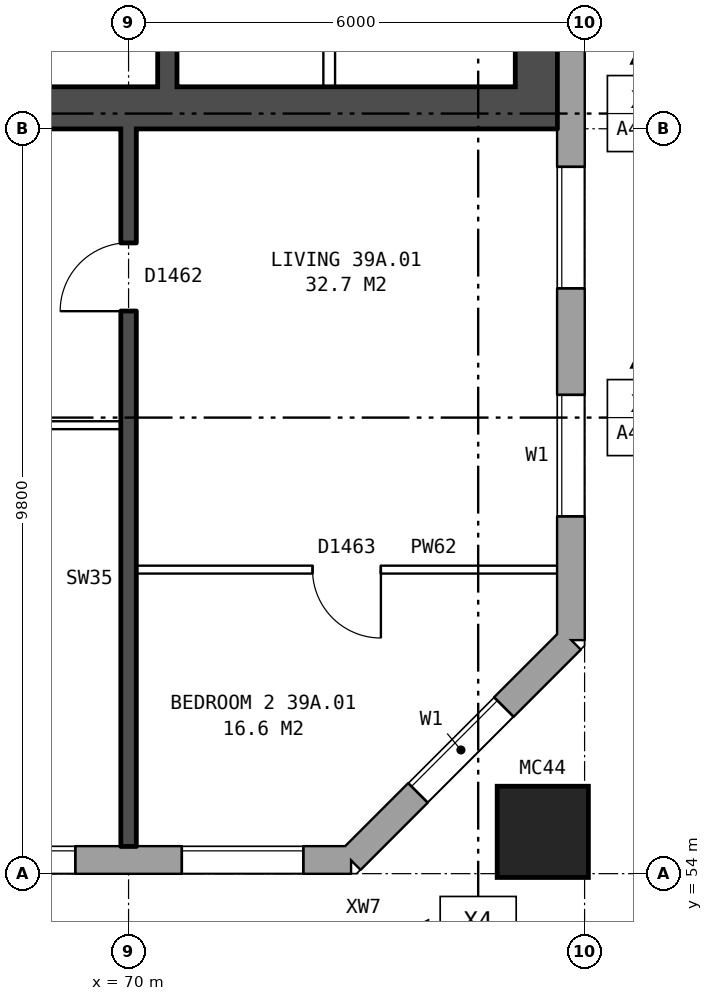
"""IFC4 building model, lengths in metres.
Left out: names, types, materials, properties, quantities, classifications, styles, units other than length and angle.
Written with IfcOpenShell. Run it as: python <this file> out.ifc"""

import sys

from ifc_helpers import new_model, si_unit, direction, frame, frame_2d, origin, origin_2d, place, context, subcontext, project, spatial, rectangle, hollow_rectangle, extrude, element, fill, save


model = new_model("IFC4")
c1 = context("Model", 3, precision=1e-05, world=origin(), true_north=direction((0.0, 1.0)))
c2 = subcontext(c1, "Body", "Model", "MODEL_VIEW")
j1 = project(units=[si_unit("LENGTHUNIT", "METRE"), si_unit("PLANEANGLEUNIT", "RADIAN")], contexts=[c1])
p1 = place(None, origin())
s1 = spatial("IfcSite", under=j1, at=p1, CompositionType="ELEMENT")
p2 = place(p1, origin())
s2 = spatial("IfcBuilding", under=s1, at=p2, CompositionType="ELEMENT")
p3 = place(p2, frame((0.0, 0.0, 139.2)))
s3 = spatial("IfcBuildingStorey", under=s2, at=p3, CompositionType="ELEMENT", Elevation=139.2)
p4 = place(p3, frame((75.45, 54.55, 0.0), z_axis=(0.0, 0.0, 1.0), x_axis=(1.0, 0.0, 0.0)))
e1 = element("IfcColumn", 1, at=p4, inside=s3, PredefinedType="COLUMN", context=c2, shape_type="SweptSolid", body=[
    extrude(hollow_rectangle(XDim=1.2, YDim=1.2, WallThickness=0.065, at=origin_2d()), origin(), (0.0, 0.0, 1.0), 3.1),
])
p5 = place(p3, frame((29.825, 54.18, 0.0), z_axis=(0.0, 0.0, 1.0), x_axis=(1.0, 0.0, 0.0)))
e2 = element("IfcWall", 2, at=p5, inside=s3, PredefinedType="STANDARD", context=c2, shape_type="SweptSolid", body=[
    extrude(rectangle(XDim=43.101, YDim=0.36, at=frame_2d((21.55, 0.0))), origin(), (0.0, 0.0, 1.0), 2.85),
])
p6 = place(p5, frame((1.875, 0.0, 0.8)))
e3 = element("IfcOpeningElement", 3, at=p6, cuts=e2, PredefinedType="OPENING", context=c2, shape_type="SweptSolid", body=[
    extrude(rectangle(XDim=1.6, YDim=1.8, at=frame_2d((0.8, 0.9))), frame((0.0, 0.19, 0.0), z_axis=(0.0, -1.0, 0.0), x_axis=(1.0, 0.0, 0.0)), (0.0, 0.0, 1.0), 0.38),
])
p7 = place(p5, frame((4.875, 0.0, 0.8)))
e4 = element("IfcOpeningElement", 4, at=p7, cuts=e2, PredefinedType="OPENING", context=c2, shape_type="SweptSolid", body=[
    extrude(rectangle(XDim=1.6, YDim=1.8, at=frame_2d((0.8, 0.9))), frame((0.0, 0.19, 0.0), z_axis=(0.0, -1.0, 0.0), x_axis=(1.0, 0.0, 0.0)), (0.0, 0.0, 1.0), 0.38),
])
p8 = place(p5, frame((7.875, 0.0, 0.8)))
e5 = element("IfcOpeningElement", 5, at=p8, cuts=e2, PredefinedType="OPENING", context=c2, shape_type="SweptSolid", body=[
    extrude(rectangle(XDim=1.6, YDim=1.8, at=frame_2d((0.8, 0.9))), frame((0.0, 0.19, 0.0), z_axis=(0.0, -1.0, 0.0), x_axis=(1.0, 0.0, 0.0)), (0.0, 0.0, 1.0), 0.38),
])
p9 = place(p5, frame((10.875, 0.0, 0.8)))
e6 = element("IfcOpeningElement", 6, at=p9, cuts=e2, PredefinedType="OPENING", context=c2, shape_type="SweptSolid", body=[
    extrude(rectangle(XDim=1.6, YDim=1.8, at=frame_2d((0.8, 0.9))), frame((0.0, 0.19, 0.0), z_axis=(0.0, -1.0, 0.0), x_axis=(1.0, 0.0, 0.0)), (0.0, 0.0, 1.0), 0.38),
])
p10 = place(p5, frame((13.875, 0.0, 0.8)))
e7 = element("IfcOpeningElement", 7, at=p10, cuts=e2, PredefinedType="OPENING", context=c2, shape_type="SweptSolid", body=[
    extrude(rectangle(XDim=1.6, YDim=1.8, at=frame_2d((0.8, 0.9))), frame((0.0, 0.19, 0.0), z_axis=(0.0, -1.0, 0.0), x_axis=(1.0, 0.0, 0.0)), (0.0, 0.0, 1.0), 0.38),
])
p11 = place(p5, frame((16.875, 0.0, 0.8)))
e8 = element("IfcOpeningElement", 8, at=p11, cuts=e2, PredefinedType="OPENING", context=c2, shape_type="SweptSolid", body=[
    extrude(rectangle(XDim=1.6, YDim=1.8, at=frame_2d((0.8, 0.9))), frame((0.0, 0.19, 0.0), z_axis=(0.0, -1.0, 0.0), x_axis=(1.0, 0.0, 0.0)), (0.0, 0.0, 1.0), 0.38),
])
p12 = place(p5, frame((20.975, 0.0, 0.15)))
e9 = element("IfcOpeningElement", 9, at=p12, cuts=e2, PredefinedType="OPENING", context=c2, shape_type="SweptSolid", body=[
    extrude(rectangle(XDim=1.0, YDim=1.5, at=frame_2d((0.5, 0.75))), frame((0.0, 0.19, 0.0), z_axis=(0.0, -1.0, 0.0), x_axis=(1.0, 0.0, 0.0)), (0.0, 0.0, 1.0), 0.38),
])
p13 = place(p5, frame((23.225, 0.0, 1.7)))
e10 = element("IfcOpeningElement", 10, at=p13, cuts=e2, PredefinedType="OPENING", context=c2, shape_type="SweptSolid", body=[
    extrude(rectangle(XDim=0.6, YDim=0.9, at=frame_2d((0.3, 0.45))), frame((0.0, 0.19, 0.0), z_axis=(0.0, -1.0, 0.0), x_axis=(1.0, 0.0, 0.0)), (0.0, 0.0, 1.0), 0.38),
])
p14 = place(p5, frame((25.875, 0.0, 0.8)))
e11 = element("IfcOpeningElement", 11, at=p14, cuts=e2, PredefinedType="OPENING", context=c2, shape_type="SweptSolid", body=[
    extrude(rectangle(XDim=1.6, YDim=1.8, at=frame_2d((0.8, 0.9))), frame((0.0, 0.19, 0.0), z_axis=(0.0, -1.0, 0.0), x_axis=(1.0, 0.0, 0.0)), (0.0, 0.0, 1.0), 0.38),
])
p15 = place(p5, frame((28.875, 0.0, 0.8)))
e12 = element("IfcOpeningElement", 12, at=p15, cuts=e2, PredefinedType="OPENING", context=c2, shape_type="SweptSolid", body=[
    extrude(rectangle(XDim=1.6, YDim=1.8, at=frame_2d((0.8, 0.9))), frame((0.0, 0.19, 0.0), z_axis=(0.0, -1.0, 0.0), x_axis=(1.0, 0.0, 0.0)), (0.0, 0.0, 1.0), 0.38),
])
p16 = place(p5, frame((31.875, 0.0, 0.8)))
e13 = element("IfcOpeningElement", 13, at=p16, cuts=e2, PredefinedType="OPENING", context=c2, shape_type="SweptSolid", body=[
    extrude(rectangle(XDim=1.6, YDim=1.8, at=frame_2d((0.8, 0.9))), frame((0.0, 0.19, 0.0), z_axis=(0.0, -1.0, 0.0), x_axis=(1.0, 0.0, 0.0)), (0.0, 0.0, 1.0), 0.38),
])
p17 = place(p5, frame((34.875, 0.0, 0.8)))
e14 = element("IfcOpeningElement", 14, at=p17, cuts=e2, PredefinedType="OPENING", context=c2, shape_type="SweptSolid", body=[
    extrude(rectangle(XDim=1.6, YDim=1.8, at=frame_2d((0.8, 0.9))), frame((0.0, 0.19, 0.0), z_axis=(0.0, -1.0, 0.0), x_axis=(1.0, 0.0, 0.0)), (0.0, 0.0, 1.0), 0.38),
])
p18 = place(p5, frame((37.875, 0.0, 0.8)))
e15 = element("IfcOpeningElement", 15, at=p18, cuts=e2, PredefinedType="OPENING", context=c2, shape_type="SweptSolid", body=[
    extrude(rectangle(XDim=1.6, YDim=1.8, at=frame_2d((0.8, 0.9))), frame((0.0, 0.19, 0.0), z_axis=(0.0, -1.0, 0.0), x_axis=(1.0, 0.0, 0.0)), (0.0, 0.0, 1.0), 0.38),
])
p19 = place(p5, frame((40.875, 0.0, 0.8)))
e16 = element("IfcOpeningElement", 16, at=p19, cuts=e2, PredefinedType="OPENING", context=c2, shape_type="SweptSolid", body=[
    extrude(rectangle(XDim=1.6, YDim=1.8, at=frame_2d((0.8, 0.9))), frame((0.0, 0.19, 0.0), z_axis=(0.0, -1.0, 0.0), x_axis=(1.0, 0.0, 0.0)), (0.0, 0.0, 1.0), 0.38),
])
p20 = place(p5, frame((24.225, 0.0, 0.8)))
e17 = element("IfcOpeningElement", 17, at=p20, cuts=e2, PredefinedType="OPENING", context=c2, shape_type="SweptSolid", body=[
    extrude(rectangle(XDim=0.8, YDim=1.8, at=frame_2d((0.4, 0.9))), frame((0.0, 0.19, 0.0), z_axis=(0.0, -1.0, 0.0), x_axis=(1.0, 0.0, 0.0)), (0.0, 0.0, 1.0), 0.38),
])
p21 = place(p3, frame((72.925, 54.18, 0.0), z_axis=(0.0, 0.0, 1.0), x_axis=(0.707106781187, 0.707106781187, 0.0)))
e18 = element("IfcWall", 18, at=p21, inside=s3, PredefinedType="STANDARD", context=c2, shape_type="SweptSolid", body=[
    extrude(rectangle(XDim=4.094, YDim=0.36, at=frame_2d((2.047, 0.0))), origin(), (0.0, 0.0, 1.0), 2.85),
])
p22 = place(p21, frame((1.247, 0.0, 0.8)))
e19 = element("IfcOpeningElement", 19, at=p22, cuts=e18, PredefinedType="OPENING", context=c2, shape_type="SweptSolid", body=[
    extrude(rectangle(XDim=1.6, YDim=1.8, at=frame_2d((0.8, 0.9))), frame((0.0, 0.19, 0.0), z_axis=(0.0, -1.0, 0.0), x_axis=(1.0, 0.0, 0.0)), (0.0, 0.0, 1.0), 0.38),
])
p23 = place(p3, frame((75.82, 57.075, 0.0), z_axis=(0.0, 0.0, 1.0), x_axis=(0.0, 1.0, 0.0)))
e20 = element("IfcWall", 20, at=p23, inside=s3, PredefinedType="STANDARD", context=c2, shape_type="SweptSolid", body=[
    extrude(rectangle(XDim=25.851, YDim=0.36, at=frame_2d((12.925, 0.0))), origin(), (0.0, 0.0, 1.0), 2.85),
])
p24 = place(p23, frame((1.625, 0.0, 0.8)))
e21 = element("IfcOpeningElement", 21, at=p24, cuts=e20, PredefinedType="OPENING", context=c2, shape_type="SweptSolid", body=[
    extrude(rectangle(XDim=1.6, YDim=1.8, at=frame_2d((0.8, 0.9))), frame((0.0, 0.19, 0.0), z_axis=(0.0, -1.0, 0.0), x_axis=(1.0, 0.0, 0.0)), (0.0, 0.0, 1.0), 0.38),
])
p25 = place(p23, frame((4.625, 0.0, 0.8)))
e22 = element("IfcOpeningElement", 22, at=p25, cuts=e20, PredefinedType="OPENING", context=c2, shape_type="SweptSolid", body=[
    extrude(rectangle(XDim=1.6, YDim=1.8, at=frame_2d((0.8, 0.9))), frame((0.0, 0.19, 0.0), z_axis=(0.0, -1.0, 0.0), x_axis=(1.0, 0.0, 0.0)), (0.0, 0.0, 1.0), 0.38),
])
p26 = place(p23, frame((19.625, 0.0, 0.8)))
e23 = element("IfcOpeningElement", 23, at=p26, cuts=e20, PredefinedType="OPENING", context=c2, shape_type="SweptSolid", body=[
    extrude(rectangle(XDim=1.6, YDim=1.8, at=frame_2d((0.8, 0.9))), frame((0.0, 0.19, 0.0), z_axis=(0.0, -1.0, 0.0), x_axis=(1.0, 0.0, 0.0)), (0.0, 0.0, 1.0), 0.38),
])
p27 = place(p23, frame((22.625, 0.0, 0.8)))
e24 = element("IfcOpeningElement", 24, at=p27, cuts=e20, PredefinedType="OPENING", context=c2, shape_type="SweptSolid", body=[
    extrude(rectangle(XDim=1.6, YDim=1.8, at=frame_2d((0.8, 0.9))), frame((0.0, 0.19, 0.0), z_axis=(0.0, -1.0, 0.0), x_axis=(1.0, 0.0, 0.0)), (0.0, 0.0, 1.0), 0.38),
])
p28 = place(p3, frame((75.365, 63.8, 0.0), z_axis=(0.0, 0.0, 1.0), x_axis=(0.0, 1.0, 0.0)))
e25 = element("IfcWall", 25, at=p28, inside=s3, PredefinedType="SHEAR", context=c2, shape_type="SweptSolid", body=[
    extrude(rectangle(XDim=12.4, YDim=0.55, at=frame_2d((6.2, 0.0))), origin(), (0.0, 0.0, 1.0), 2.85),
])
p29 = place(p3, frame((67.19, 64.075, 0.0), z_axis=(0.0, 0.0, 1.0), x_axis=(1.0, 0.0, 0.0)))
e26 = element("IfcWall", 26, at=p29, inside=s3, PredefinedType="SHEAR", context=c2, shape_type="SweptSolid", body=[
    extrude(rectangle(XDim=7.9, YDim=0.55, at=frame_2d((3.95, 0.0))), origin(), (0.0, 0.0, 1.0), 2.85),
])
p30 = place(p3, frame((70.51, 64.35, 0.0), z_axis=(0.0, 0.0, 1.0), x_axis=(0.0, 1.0, 0.0)))
e27 = element("IfcWall", 27, at=p30, inside=s3, PredefinedType="SHEAR", context=c2, shape_type="SweptSolid", body=[
    extrude(rectangle(XDim=2.375, YDim=0.25, at=frame_2d((1.188, 0.0))), origin(), (0.0, 0.0, 1.0), 2.85),
])
p31 = place(p3, frame((72.64, 64.35, 0.0), z_axis=(0.0, 0.0, 1.0), x_axis=(0.0, 1.0, 0.0)))
e28 = element("IfcWall", 28, at=p31, inside=s3, PredefinedType="PARTITIONING", context=c2, shape_type="SweptSolid", body=[
    extrude(rectangle(XDim=1.875, YDim=0.15, at=frame_2d((0.938, 0.0))), origin(), (0.0, 0.0, 1.0), 2.85),
])
p32 = place(p31, frame((0.512, 0.0, 0.0)))
e29 = element("IfcOpeningElement", 29, at=p32, cuts=e28, PredefinedType="OPENING", context=c2, shape_type="SweptSolid", body=[
    extrude(rectangle(XDim=0.85, YDim=2.1, at=frame_2d((0.425, 1.05))), frame((0.0, 0.085, 0.0), z_axis=(0.0, -1.0, 0.0), x_axis=(1.0, 0.0, 0.0)), (0.0, 0.0, 1.0), 0.17),
])
p33 = place(p3, frame((70.1, 58.0, 0.0), z_axis=(0.0, 0.0, 1.0), x_axis=(1.0, 0.0, 0.0)))
e30 = element("IfcWall", 30, at=p33, inside=s3, PredefinedType="PARTITIONING", context=c2, shape_type="SweptSolid", body=[
    extrude(rectangle(XDim=5.54, YDim=0.1, at=frame_2d((2.77, 0.0))), origin(), (0.0, 0.0, 1.0), 2.85),
])
p34 = place(p33, frame((2.32, 0.0, 0.0)))
e31 = element("IfcOpeningElement", 31, at=p34, cuts=e30, PredefinedType="OPENING", context=c2, shape_type="SweptSolid", body=[
    extrude(rectangle(XDim=0.9, YDim=2.1, at=frame_2d((0.45, 1.05))), frame((0.0, 0.06, 0.0), z_axis=(0.0, -1.0, 0.0), x_axis=(1.0, 0.0, 0.0)), (0.0, 0.0, 1.0), 0.12),
])
p35 = place(p3, frame((64.1, 59.9, 0.0), z_axis=(0.0, 0.0, 1.0), x_axis=(1.0, 0.0, 0.0)))
e32 = element("IfcWall", 32, at=p35, inside=s3, PredefinedType="PARTITIONING", context=c2, shape_type="SweptSolid", body=[
    extrude(rectangle(XDim=5.8, YDim=0.1, at=frame_2d((2.9, 0.0))), origin(), (0.0, 0.0, 1.0), 2.85),
])
p36 = place(p35, frame((3.6, 0.0, 0.0)))
e33 = element("IfcOpeningElement", 33, at=p36, cuts=e32, PredefinedType="OPENING", context=c2, shape_type="SweptSolid", body=[
    extrude(rectangle(XDim=0.9, YDim=2.1, at=frame_2d((0.45, 1.05))), frame((0.0, 0.06, 0.0), z_axis=(0.0, -1.0, 0.0), x_axis=(1.0, 0.0, 0.0)), (0.0, 0.0, 1.0), 0.12),
])
p37 = place(p35, frame((0.7, 0.0, 0.0)))
e34 = element("IfcOpeningElement", 34, at=p37, cuts=e32, PredefinedType="OPENING", context=c2, shape_type="SweptSolid", body=[
    extrude(rectangle(XDim=0.9, YDim=2.1, at=frame_2d((0.45, 1.05))), frame((0.0, 0.06, 0.0), z_axis=(0.0, -1.0, 0.0), x_axis=(1.0, 0.0, 0.0)), (0.0, 0.0, 1.0), 0.12),
])
p38 = place(p3, frame((70.0, 54.36, 0.0), z_axis=(0.0, 0.0, 1.0), x_axis=(0.0, 1.0, 0.0)))
e35 = element("IfcWall", 35, at=p38, inside=s3, PredefinedType="SOLIDWALL", context=c2, shape_type="SweptSolid", body=[
    extrude(rectangle(XDim=9.44, YDim=0.2, at=frame_2d((4.72, 0.0))), origin(), (0.0, 0.0, 1.0), 2.85),
])
p39 = place(p38, frame((7.04, 0.0, 0.0)))
e36 = element("IfcOpeningElement", 36, at=p39, cuts=e35, PredefinedType="OPENING", context=c2, shape_type="SweptSolid", body=[
    extrude(rectangle(XDim=0.9, YDim=2.1, at=frame_2d((0.45, 1.05))), frame((0.0, 0.11, 0.0), z_axis=(0.0, -1.0, 0.0), x_axis=(1.0, 0.0, 0.0)), (0.0, 0.0, 1.0), 0.22),
])
p40 = place(p18, origin())
e37 = element("IfcWindow", 37, at=p40, inside=s3, PartitioningType="SINGLE_PANEL", PredefinedType="WINDOW", context=c2, shape_type="SweptSolid", body=[
    extrude(rectangle(XDim=1.6, YDim=1.8, at=frame_2d((0.8, 0.9))), frame((0.0, 0.15, 0.0), z_axis=(0.0, -1.0, 0.0), x_axis=(1.0, 0.0, 0.0)), (0.0, 0.0, 1.0), 0.06),
])
fill(e15, e37)
p41 = place(p19, origin())
e38 = element("IfcWindow", 38, at=p41, inside=s3, PartitioningType="SINGLE_PANEL", PredefinedType="WINDOW", context=c2, shape_type="SweptSolid", body=[
    extrude(rectangle(XDim=1.6, YDim=1.8, at=frame_2d((0.8, 0.9))), frame((0.0, 0.15, 0.0), z_axis=(0.0, -1.0, 0.0), x_axis=(1.0, 0.0, 0.0)), (0.0, 0.0, 1.0), 0.06),
])
fill(e16, e38)
p42 = place(p22, origin())
e39 = element("IfcWindow", 39, at=p42, inside=s3, PartitioningType="SINGLE_PANEL", PredefinedType="WINDOW", context=c2, shape_type="SweptSolid", body=[
    extrude(rectangle(XDim=1.6, YDim=1.8, at=frame_2d((0.8, 0.9))), frame((0.0, 0.15, 0.0), z_axis=(0.0, -1.0, 0.0), x_axis=(1.0, 0.0, 0.0)), (0.0, 0.0, 1.0), 0.06),
])
fill(e19, e39)
p43 = place(p24, origin())
e40 = element("IfcWindow", 40, at=p43, inside=s3, PartitioningType="SINGLE_PANEL", PredefinedType="WINDOW", context=c2, shape_type="SweptSolid", body=[
    extrude(rectangle(XDim=1.6, YDim=1.8, at=frame_2d((0.8, 0.9))), frame((0.0, 0.15, 0.0), z_axis=(0.0, -1.0, 0.0), x_axis=(1.0, 0.0, 0.0)), (0.0, 0.0, 1.0), 0.06),
])
fill(e21, e40)
p44 = place(p25, origin())
e41 = element("IfcWindow", 41, at=p44, inside=s3, PartitioningType="SINGLE_PANEL", PredefinedType="WINDOW", context=c2, shape_type="SweptSolid", body=[
    extrude(rectangle(XDim=1.6, YDim=1.8, at=frame_2d((0.8, 0.9))), frame((0.0, 0.15, 0.0), z_axis=(0.0, -1.0, 0.0), x_axis=(1.0, 0.0, 0.0)), (0.0, 0.0, 1.0), 0.06),
])
fill(e22, e41)
p45 = place(p34, frame((0.9, 0.0, 0.0), z_axis=(0.0, 0.0, 1.0), x_axis=(-1.0, 0.0, 0.0)))
e42 = element("IfcDoor", 42, at=p45, inside=s3, OperationType="SINGLE_SWING_LEFT", PredefinedType="DOOR", context=c2, shape_type="SweptSolid", body=[
    extrude(rectangle(XDim=0.9, YDim=2.1, at=frame_2d((0.45, 1.05))), frame((0.0, 0.025, 0.0), z_axis=(0.0, -1.0, 0.0), x_axis=(1.0, 0.0, 0.0)), (0.0, 0.0, 1.0), 0.05),
])
fill(e31, e42)
p46 = place(p39, origin())
e43 = element("IfcDoor", 43, at=p46, inside=s3, OperationType="SINGLE_SWING_LEFT", PredefinedType="DOOR", context=c2, shape_type="SweptSolid", body=[
    extrude(rectangle(XDim=0.9, YDim=2.1, at=frame_2d((0.45, 1.05))), frame((0.0, 0.025, 0.0), z_axis=(0.0, -1.0, 0.0), x_axis=(1.0, 0.0, 0.0)), (0.0, 0.0, 1.0), 0.05),
])
fill(e36, e43)
save(model, sys.argv[1])
